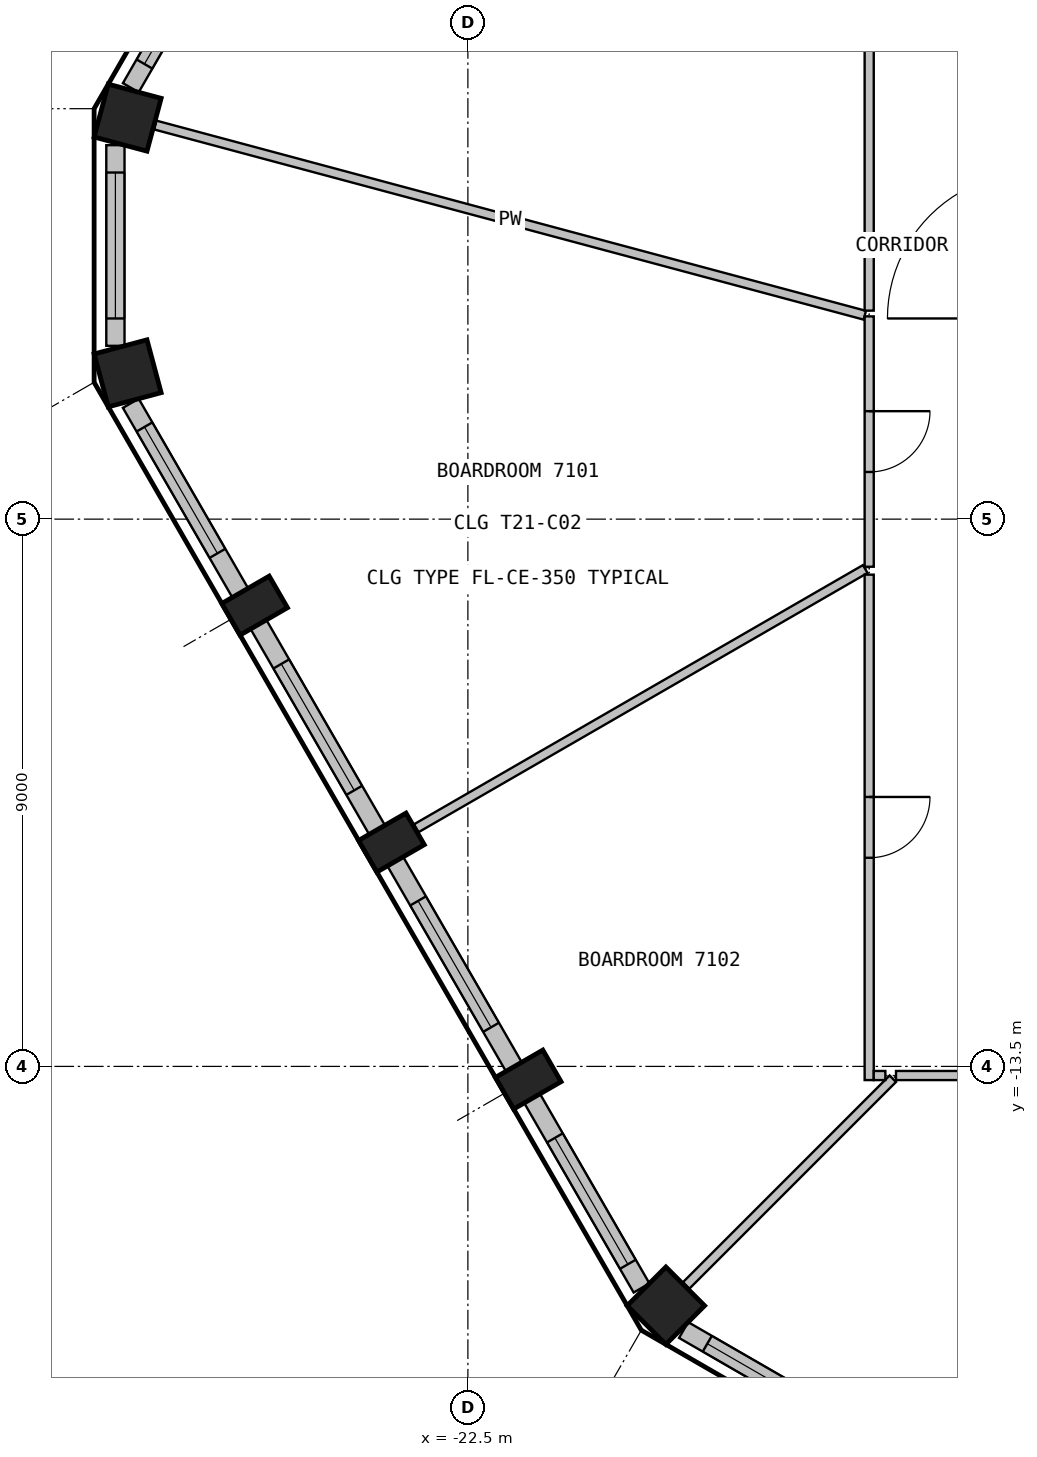
"""IFC4 building model, lengths in metres.
Left out: names, types, materials, properties, quantities, classifications, styles, units other than length and angle.
Written with IfcOpenShell. Run it as: python <this file> out.ifc"""

import sys

from ifc_helpers import new_model, si_unit, direction, frame, frame_2d, origin, origin_2d, place, context, subcontext, project, spatial, rectangle, extrude, element, fill, save


model = new_model("IFC4")
c1 = context("Model", 3, precision=1e-05, world=origin(), true_north=direction((0.0, 1.0)))
c2 = subcontext(c1, "Body", "Model", "MODEL_VIEW")
j1 = project(units=[si_unit("LENGTHUNIT", "METRE"), si_unit("PLANEANGLEUNIT", "RADIAN")], contexts=[c1])
p1 = place(None, origin())
s1 = spatial("IfcSite", under=j1, at=p1, CompositionType="ELEMENT")
p2 = place(p1, origin())
s2 = spatial("IfcBuilding", under=s1, at=p2, CompositionType="ELEMENT")
p3 = place(p2, frame((0.0, 0.0, 286.5)))
s3 = spatial("IfcBuildingStorey", under=s2, at=p3, CompositionType="ELEMENT", Elevation=286.5)
for number, where, z_axis, x_axis in (
    (1, (-28.096, 2.102, 0.0), (0.0, 0.0, 1.0), (-0.259, -0.966, 0.0)),
    (2, (-28.096, -2.102, 0.0), (0.0, 0.0, 1.0), (0.259, -0.966, 0.0)),
):
    element("IfcColumn", number, at=place(p3, frame(where, z_axis=z_axis, x_axis=x_axis)), inside=s3, PredefinedType="COLUMN", context=c2, shape_type="SweptSolid", body=[
        extrude(rectangle(XDim=0.9, YDim=0.9, at=origin_2d()), origin(), (0.0, 0.0, 1.0), 3.575),
    ])
for number, where, z_axis, x_axis in (
    (3, (-26.007, -5.922, 0.0), (0.0, 0.0, 1.0), (0.5, -0.866, 0.0)),
    (4, (-23.757, -9.819, 0.0), (0.0, 0.0, 1.0), (0.5, -0.866, 0.0)),
    (5, (-21.507, -13.716, 0.0), (0.0, 0.0, 1.0), (0.5, -0.866, 0.0)),
):
    element("IfcColumn", number, at=place(p3, frame(where, z_axis=z_axis, x_axis=x_axis)), inside=s3, PredefinedType="COLUMN", context=c2, shape_type="SweptSolid", body=[
        extrude(rectangle(XDim=0.6, YDim=0.9, at=origin_2d()), origin(), (0.0, 0.0, 1.0), 3.575),
    ])
p4 = place(p3, frame((-19.244, -17.435, 0.0), z_axis=(0.0, 0.0, 1.0), x_axis=(0.707106781187, -0.707106781187, 0.0)))
e6 = element("IfcColumn", 6, at=p4, inside=s3, PredefinedType="COLUMN", context=c2, shape_type="SweptSolid", body=[
    extrude(rectangle(XDim=0.9, YDim=0.9, at=origin_2d()), origin(), (0.0, 0.0, 1.0), 3.575),
])
p5 = place(p3, frame((-26.244, 5.712, 0.0), z_axis=(0.0, 0.0, 1.0), x_axis=(-0.499969057507, -0.866043267704, 0.0)))
e7 = element("IfcWall", 7, at=p5, inside=s3, PredefinedType="SOLIDWALL", context=c2, shape_type="SweptSolid", body=[
    extrude(rectangle(XDim=3.599, YDim=0.3, at=frame_2d((1.8, 0.0))), origin(), (0.0, 0.0, 1.0), 3.575),
])
p6 = place(p5, frame((0.75, 0.0, 0.9)))
e8 = element("IfcOpeningElement", 8, at=p6, cuts=e7, PredefinedType="OPENING", context=c2, shape_type="SweptSolid", body=[
    extrude(rectangle(XDim=2.4, YDim=2.1, at=frame_2d((1.2, 1.05))), frame((0.0, 0.16, 0.0), z_axis=(0.0, -1.0, 0.0), x_axis=(1.0, 0.0, 0.0)), (0.0, 0.0, 1.0), 0.32),
])
p7 = place(p3, frame((-28.297, 1.65, 0.0), z_axis=(0.0, 0.0, 1.0), x_axis=(0.0, -1.0, 0.0)))
e9 = element("IfcWall", 9, at=p7, inside=s3, PredefinedType="SOLIDWALL", context=c2, shape_type="SweptSolid", body=[
    extrude(rectangle(XDim=3.3, YDim=0.3, at=frame_2d((1.65, 0.0))), origin(), (0.0, 0.0, 1.0), 3.575),
])
p8 = place(p7, frame((0.45, 0.0, 0.9)))
e10 = element("IfcOpeningElement", 10, at=p8, cuts=e9, PredefinedType="OPENING", context=c2, shape_type="SweptSolid", body=[
    extrude(rectangle(XDim=2.4, YDim=2.1, at=frame_2d((1.2, 1.05))), frame((0.0, 0.16, 0.0), z_axis=(0.0, -1.0, 0.0), x_axis=(1.0, 0.0, 0.0)), (0.0, 0.0, 1.0), 0.32),
])
p9 = place(p3, frame((-28.044, -2.595, 0.0), z_axis=(0.0, 0.0, 1.0), x_axis=(0.499969057507, -0.866043267704, 0.0)))
e11 = element("IfcWall", 11, at=p9, inside=s3, PredefinedType="SOLIDWALL", context=c2, shape_type="SweptSolid", body=[
    extrude(rectangle(XDim=3.599, YDim=0.3, at=frame_2d((1.8, 0.0))), origin(), (0.0, 0.0, 1.0), 3.575),
])
p10 = place(p9, frame((0.45, 0.0, 0.9)))
e12 = element("IfcOpeningElement", 12, at=p10, cuts=e11, PredefinedType="OPENING", context=c2, shape_type="SweptSolid", body=[
    extrude(rectangle(XDim=2.4, YDim=2.1, at=frame_2d((1.2, 1.05))), frame((0.0, 0.16, 0.0), z_axis=(0.0, -1.0, 0.0), x_axis=(1.0, 0.0, 0.0)), (0.0, 0.0, 1.0), 0.32),
])
p11 = place(p3, frame((-25.944, -6.232, 0.0), z_axis=(0.0, 0.0, 1.0), x_axis=(0.500011542666, -0.866018739521, 0.0)))
e13 = element("IfcWall", 13, at=p11, inside=s3, PredefinedType="SOLIDWALL", context=c2, shape_type="SweptSolid", body=[
    extrude(rectangle(XDim=3.899, YDim=0.3, at=frame_2d((1.949, 0.0))), origin(), (0.0, 0.0, 1.0), 3.575),
])
p12 = place(p11, frame((0.75, 0.0, 0.9)))
e14 = element("IfcOpeningElement", 14, at=p12, cuts=e13, PredefinedType="OPENING", context=c2, shape_type="SweptSolid", body=[
    extrude(rectangle(XDim=2.4, YDim=2.1, at=frame_2d((1.2, 1.05))), frame((0.0, 0.16, 0.0), z_axis=(0.0, -1.0, 0.0), x_axis=(1.0, 0.0, 0.0)), (0.0, 0.0, 1.0), 0.32),
])
p13 = place(p3, frame((-23.694, -10.129, 0.0), z_axis=(0.0, 0.0, 1.0), x_axis=(0.499984428715, -0.866034393683, 0.0)))
e15 = element("IfcWall", 15, at=p13, inside=s3, PredefinedType="SOLIDWALL", context=c2, shape_type="SweptSolid", body=[
    extrude(rectangle(XDim=3.899, YDim=0.3, at=frame_2d((1.949, 0.0))), origin(), (0.0, 0.0, 1.0), 3.575),
])
p14 = place(p13, frame((0.75, 0.0, 0.9)))
e16 = element("IfcOpeningElement", 16, at=p14, cuts=e15, PredefinedType="OPENING", context=c2, shape_type="SweptSolid", body=[
    extrude(rectangle(XDim=2.4, YDim=2.1, at=frame_2d((1.2, 1.05))), frame((0.0, 0.16, 0.0), z_axis=(0.0, -1.0, 0.0), x_axis=(1.0, 0.0, 0.0)), (0.0, 0.0, 1.0), 0.32),
])
p15 = place(p3, frame((-21.444, -14.027, 0.0), z_axis=(0.0, 0.0, 1.0), x_axis=(0.50001992892, -0.866013897511, 0.0)))
e17 = element("IfcWall", 17, at=p15, inside=s3, PredefinedType="SOLIDWALL", context=c2, shape_type="SweptSolid", body=[
    extrude(rectangle(XDim=3.599, YDim=0.3, at=frame_2d((1.8, 0.0))), origin(), (0.0, 0.0, 1.0), 3.575),
])
p16 = place(p15, frame((0.75, 0.0, 0.9)))
e18 = element("IfcOpeningElement", 18, at=p16, cuts=e17, PredefinedType="OPENING", context=c2, shape_type="SweptSolid", body=[
    extrude(rectangle(XDim=2.4, YDim=2.1, at=frame_2d((1.2, 1.05))), frame((0.0, 0.16, 0.0), z_axis=(0.0, -1.0, 0.0), x_axis=(1.0, 0.0, 0.0)), (0.0, 0.0, 1.0), 0.32),
])
p17 = place(p3, frame((-18.952, -17.835, 0.0), z_axis=(0.0, 0.0, 1.0), x_axis=(0.866021716278, -0.500006386895, 0.0)))
e19 = element("IfcWall", 19, at=p17, inside=s3, PredefinedType="SOLIDWALL", context=c2, shape_type="SweptSolid", body=[
    extrude(rectangle(XDim=3.3, YDim=0.3, at=frame_2d((1.65, 0.0))), origin(), (0.0, 0.0, 1.0), 3.575),
])
p18 = place(p17, frame((0.45, 0.0, 0.9)))
e20 = element("IfcOpeningElement", 20, at=p18, cuts=e19, PredefinedType="OPENING", context=c2, shape_type="SweptSolid", body=[
    extrude(rectangle(XDim=2.4, YDim=2.1, at=frame_2d((1.2, 1.05))), frame((0.0, 0.16, 0.0), z_axis=(0.0, -1.0, 0.0), x_axis=(1.0, 0.0, 0.0)), (0.0, 0.0, 1.0), 0.32),
])
p19 = place(p3, frame((-27.642, 1.981, 0.0), z_axis=(0.0, 0.0, 1.0), x_axis=(0.965912869078, -0.258867397232, 0.0)))
e21 = element("IfcWall", 21, at=p19, inside=s3, PredefinedType="PARTITIONING", context=c2, shape_type="SweptSolid", body=[
    extrude(rectangle(XDim=12.081, YDim=0.15, at=frame_2d((6.041, 0.0))), origin(), (0.0, 0.0, 1.0), 3.575),
])
p20 = place(p3, frame((-15.965, -5.321, 0.0), z_axis=(0.0, 0.0, 1.0), x_axis=(-0.866035886898, -0.499981842274, 0.0)))
e22 = element("IfcWall", 22, at=p20, inside=s3, PredefinedType="PARTITIONING", context=c2, shape_type="SweptSolid", body=[
    extrude(rectangle(XDim=8.528, YDim=0.15, at=frame_2d((4.264, 0.0))), origin(), (0.0, 0.0, 1.0), 3.575),
])
p21 = place(p3, frame((-15.512, -13.703, 0.0), z_axis=(0.0, 0.0, 1.0), x_axis=(-0.707030604857, -0.70718294931, 0.0)))
e23 = element("IfcWall", 23, at=p21, inside=s3, PredefinedType="PARTITIONING", context=c2, shape_type="SweptSolid", body=[
    extrude(rectangle(XDim=4.808, YDim=0.15, at=frame_2d((2.404, 0.0))), origin(), (0.0, 0.0, 1.0), 3.575),
])
p22 = place(p3, frame((-15.9, -5.413, 0.0), z_axis=(0.0, 0.0, 1.0), x_axis=(0.0, -1.0, 0.0)))
e24 = element("IfcWall", 24, at=p22, inside=s3, PredefinedType="PARTITIONING", context=c2, shape_type="SweptSolid", body=[
    extrude(rectangle(XDim=8.312, YDim=0.15, at=frame_2d((4.156, 0.0))), origin(), (0.0, 0.0, 1.0), 3.575),
])
p23 = place(p22, frame((3.656, 0.0, 0.0)))
e25 = element("IfcOpeningElement", 25, at=p23, cuts=e24, PredefinedType="OPENING", context=c2, shape_type="SweptSolid", body=[
    extrude(rectangle(XDim=1.0, YDim=2.1, at=frame_2d((0.5, 1.05))), frame((0.0, 0.085, 0.0), z_axis=(0.0, -1.0, 0.0), x_axis=(1.0, 0.0, 0.0)), (0.0, 0.0, 1.0), 0.17),
])
p24 = place(p3, frame((-15.825, -13.65, 0.0), z_axis=(0.0, 0.0, 1.0), x_axis=(1.0, 0.0, 0.0)))
e26 = element("IfcWall", 26, at=p24, inside=s3, PredefinedType="PARTITIONING", context=c2, shape_type="SweptSolid", body=[
    extrude(rectangle(XDim=0.191, YDim=0.15, at=frame_2d((0.095, 0.0))), origin(), (0.0, 0.0, 1.0), 3.575),
])
p25 = place(p3, frame((-15.9, -1.166, 0.0), z_axis=(0.0, 0.0, 1.0), x_axis=(0.0, -1.0, 0.0)))
e27 = element("IfcWall", 27, at=p25, inside=s3, PredefinedType="PARTITIONING", context=c2, shape_type="SweptSolid", body=[
    extrude(rectangle(XDim=4.117, YDim=0.15, at=frame_2d((2.059, 0.0))), origin(), (0.0, 0.0, 1.0), 3.575),
])
p26 = place(p25, frame((1.559, 0.0, 0.0)))
e28 = element("IfcOpeningElement", 28, at=p26, cuts=e27, PredefinedType="OPENING", context=c2, shape_type="SweptSolid", body=[
    extrude(rectangle(XDim=1.0, YDim=2.1, at=frame_2d((0.5, 1.05))), frame((0.0, 0.085, 0.0), z_axis=(0.0, -1.0, 0.0), x_axis=(1.0, 0.0, 0.0)), (0.0, 0.0, 1.0), 0.17),
])
p27 = place(p3, frame((-15.9, 10.479, 0.0), z_axis=(0.0, 0.0, 1.0), x_axis=(0.0, -1.0, 0.0)))
e29 = element("IfcWall", 29, at=p27, inside=s3, PredefinedType="PARTITIONING", context=c2, shape_type="SweptSolid", body=[
    extrude(rectangle(XDim=11.55, YDim=0.15, at=frame_2d((5.775, 0.0))), origin(), (0.0, 0.0, 1.0), 3.575),
])
p28 = place(p27, frame((5.275, 0.0, 0.0)))
e30 = element("IfcOpeningElement", 30, at=p28, cuts=e29, PredefinedType="OPENING", context=c2, shape_type="SweptSolid", body=[
    extrude(rectangle(XDim=1.0, YDim=2.1, at=frame_2d((0.5, 1.05))), frame((0.0, 0.085, 0.0), z_axis=(0.0, -1.0, 0.0), x_axis=(1.0, 0.0, 0.0)), (0.0, 0.0, 1.0), 0.17),
])
p29 = place(p3, frame((-15.459, -13.65, 0.0), z_axis=(0.0, 0.0, 1.0), x_axis=(1.0, 0.0, 0.0)))
e31 = element("IfcWall", 31, at=p29, inside=s3, PredefinedType="PARTITIONING", context=c2, shape_type="SweptSolid", body=[
    extrude(rectangle(XDim=13.209, YDim=0.15, at=frame_2d((6.604, 0.0))), origin(), (0.0, 0.0, 1.0), 3.575),
])
p30 = place(p29, frame((6.104, 0.0, 0.0)))
e32 = element("IfcOpeningElement", 32, at=p30, cuts=e31, PredefinedType="OPENING", context=c2, shape_type="SweptSolid", body=[
    extrude(rectangle(XDim=1.0, YDim=2.1, at=frame_2d((0.5, 1.05))), frame((0.0, 0.085, 0.0), z_axis=(0.0, -1.0, 0.0), x_axis=(1.0, 0.0, 0.0)), (0.0, 0.0, 1.0), 0.17),
])
p31 = place(p6, origin())
e33 = element("IfcWindow", 33, at=p31, inside=s3, PartitioningType="SINGLE_PANEL", PredefinedType="WINDOW", context=c2, shape_type="SweptSolid", body=[
    extrude(rectangle(XDim=2.4, YDim=2.1, at=frame_2d((1.2, 1.05))), frame((0.0, 0.03, 0.0), z_axis=(0.0, -1.0, 0.0), x_axis=(1.0, 0.0, 0.0)), (0.0, 0.0, 1.0), 0.06),
])
fill(e8, e33)
p32 = place(p8, origin())
e34 = element("IfcWindow", 34, at=p32, inside=s3, PartitioningType="SINGLE_PANEL", PredefinedType="WINDOW", context=c2, shape_type="SweptSolid", body=[
    extrude(rectangle(XDim=2.4, YDim=2.1, at=frame_2d((1.2, 1.05))), frame((0.0, 0.03, 0.0), z_axis=(0.0, -1.0, 0.0), x_axis=(1.0, 0.0, 0.0)), (0.0, 0.0, 1.0), 0.06),
])
fill(e10, e34)
p33 = place(p10, origin())
e35 = element("IfcWindow", 35, at=p33, inside=s3, PartitioningType="SINGLE_PANEL", PredefinedType="WINDOW", context=c2, shape_type="SweptSolid", body=[
    extrude(rectangle(XDim=2.4, YDim=2.1, at=frame_2d((1.2, 1.05))), frame((0.0, 0.03, 0.0), z_axis=(0.0, -1.0, 0.0), x_axis=(1.0, 0.0, 0.0)), (0.0, 0.0, 1.0), 0.06),
])
fill(e12, e35)
p34 = place(p12, origin())
e36 = element("IfcWindow", 36, at=p34, inside=s3, PartitioningType="SINGLE_PANEL", PredefinedType="WINDOW", context=c2, shape_type="SweptSolid", body=[
    extrude(rectangle(XDim=2.4, YDim=2.1, at=frame_2d((1.2, 1.05))), frame((0.0, 0.03, 0.0), z_axis=(0.0, -1.0, 0.0), x_axis=(1.0, 0.0, 0.0)), (0.0, 0.0, 1.0), 0.06),
])
fill(e14, e36)
p35 = place(p14, origin())
e37 = element("IfcWindow", 37, at=p35, inside=s3, PartitioningType="SINGLE_PANEL", PredefinedType="WINDOW", context=c2, shape_type="SweptSolid", body=[
    extrude(rectangle(XDim=2.4, YDim=2.1, at=frame_2d((1.2, 1.05))), frame((0.0, 0.03, 0.0), z_axis=(0.0, -1.0, 0.0), x_axis=(1.0, 0.0, 0.0)), (0.0, 0.0, 1.0), 0.06),
])
fill(e16, e37)
p36 = place(p16, origin())
e38 = element("IfcWindow", 38, at=p36, inside=s3, PartitioningType="SINGLE_PANEL", PredefinedType="WINDOW", context=c2, shape_type="SweptSolid", body=[
    extrude(rectangle(XDim=2.4, YDim=2.1, at=frame_2d((1.2, 1.05))), frame((0.0, 0.03, 0.0), z_axis=(0.0, -1.0, 0.0), x_axis=(1.0, 0.0, 0.0)), (0.0, 0.0, 1.0), 0.06),
])
fill(e18, e38)
p37 = place(p18, origin())
e39 = element("IfcWindow", 39, at=p37, inside=s3, PartitioningType="SINGLE_PANEL", PredefinedType="WINDOW", context=c2, shape_type="SweptSolid", body=[
    extrude(rectangle(XDim=2.4, YDim=2.1, at=frame_2d((1.2, 1.05))), frame((0.0, 0.03, 0.0), z_axis=(0.0, -1.0, 0.0), x_axis=(1.0, 0.0, 0.0)), (0.0, 0.0, 1.0), 0.06),
])
fill(e20, e39)
p38 = place(p26, origin())
e40 = element("IfcDoor", 40, at=p38, inside=s3, OperationType="SINGLE_SWING_LEFT", PredefinedType="DOOR", context=c2, shape_type="SweptSolid", body=[
    extrude(rectangle(XDim=1.0, YDim=2.1, at=frame_2d((0.5, 1.05))), frame((0.0, 0.025, 0.0), z_axis=(0.0, -1.0, 0.0), x_axis=(1.0, 0.0, 0.0)), (0.0, 0.0, 1.0), 0.05),
])
fill(e28, e40)
p39 = place(p23, origin())
e41 = element("IfcDoor", 41, at=p39, inside=s3, OperationType="SINGLE_SWING_RIGHT", PredefinedType="DOOR", context=c2, shape_type="SweptSolid", body=[
    extrude(rectangle(XDim=1.0, YDim=2.1, at=frame_2d((0.5, 1.05))), frame((0.0, 0.025, 0.0), z_axis=(0.0, -1.0, 0.0), x_axis=(1.0, 0.0, 0.0)), (0.0, 0.0, 1.0), 0.05),
])
fill(e25, e41)
save(model, sys.argv[1])
